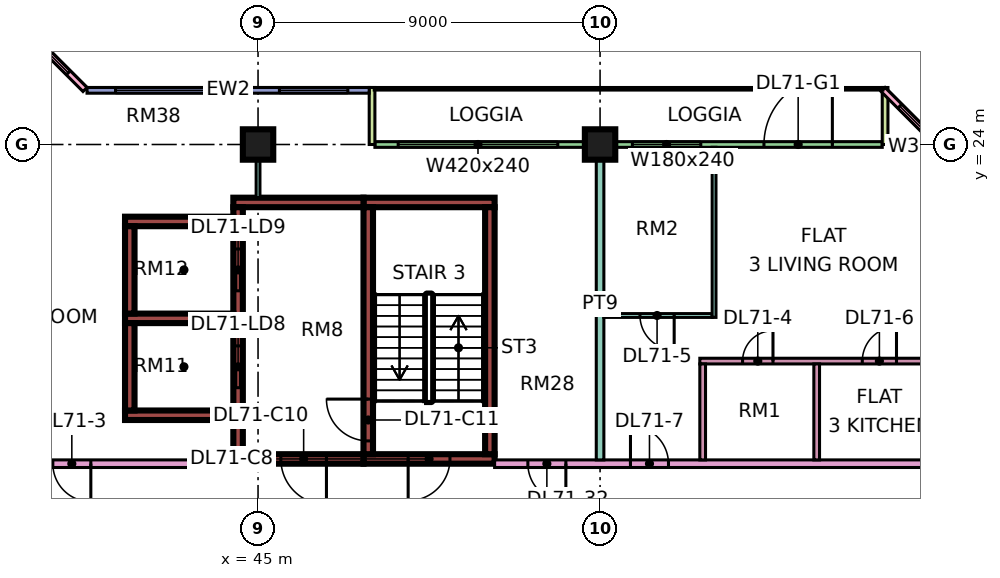
"""IFC4 building model, lengths in metres.
Left out: names, types, materials, properties, quantities, classifications, styles, units other than length and angle.
Written with IfcOpenShell. Run it as: python <this file> out.ifc"""

import sys

from ifc_helpers import new_model, si_unit, direction, frame, frame_2d, origin, origin_2d, place, context, subcontext, project, spatial, rectangle, extrude, element, fill, save


model = new_model("IFC4")
c1 = context("Model", 3, precision=1e-05, world=origin(), true_north=direction((0.0, 1.0)))
c2 = subcontext(c1, "Body", "Model", "MODEL_VIEW")
j1 = project(units=[si_unit("LENGTHUNIT", "METRE"), si_unit("PLANEANGLEUNIT", "RADIAN")], contexts=[c1])
p1 = place(None, origin())
s1 = spatial("IfcSite", under=j1, at=p1, CompositionType="ELEMENT")
p2 = place(p1, origin())
s2 = spatial("IfcBuilding", under=s1, at=p2, CompositionType="ELEMENT")
p3 = place(p2, frame((0.0, 0.0, 303.4)))
s3 = spatial("IfcBuildingStorey", under=s2, at=p3, CompositionType="ELEMENT", Elevation=303.4)
for number, where, z_axis, x_axis in (
    (1, (45.0, 24.0, 0.0), (0.0, 0.0, 1.0), (1.0, 0.0, 0.0)),
    (2, (54.0, 24.0, 0.0), (0.0, 0.0, 1.0), (1.0, 0.0, 0.0)),
):
    element("IfcColumn", number, at=place(p3, frame(where, z_axis=z_axis, x_axis=x_axis)), inside=s3, PredefinedType="COLUMN", context=c2, shape_type="SweptSolid", body=[
        extrude(rectangle(XDim=0.8, YDim=0.8, at=origin_2d()), origin(), (0.0, 0.0, 1.0), 3.75),
    ])
p4 = place(p3, frame((47.775, 15.725, 0.0), z_axis=(0.0, 0.0, 1.0), x_axis=(1.0, 0.0, 0.0)))
e3 = element("IfcWall", 3, at=p4, inside=s3, PredefinedType="SHEAR", context=c2, shape_type="SweptSolid", body=[
    extrude(rectangle(XDim=3.45, YDim=0.25, at=frame_2d((1.725, 0.0))), origin(), (0.0, 0.0, 1.0), 3.75),
])
p5 = place(p4, frame((1.175, 0.0, 0.0)))
e4 = element("IfcOpeningElement", 4, at=p5, cuts=e3, PredefinedType="OPENING", context=c2, shape_type="SweptSolid", body=[
    extrude(rectangle(XDim=1.1, YDim=2.2, at=frame_2d((0.55, 1.1))), frame((0.0, 0.135, 0.0), z_axis=(0.0, -1.0, 0.0), x_axis=(1.0, 0.0, 0.0)), (0.0, 0.0, 1.0), 0.27),
])
p6 = place(p3, frame((47.775, 22.475, 0.0), z_axis=(0.0, 0.0, 1.0), x_axis=(1.0, 0.0, 0.0)))
e5 = element("IfcWall", 5, at=p6, inside=s3, PredefinedType="SHEAR", context=c2, shape_type="SweptSolid", body=[
    extrude(rectangle(XDim=3.45, YDim=0.25, at=frame_2d((1.725, 0.0))), origin(), (0.0, 0.0, 1.0), 3.75),
])
p7 = place(p3, frame((47.9, 15.85, 0.0), z_axis=(0.0, 0.0, 1.0), x_axis=(0.0, 1.0, 0.0)))
e6 = element("IfcWall", 6, at=p7, inside=s3, PredefinedType="SHEAR", context=c2, shape_type="SweptSolid", body=[
    extrude(rectangle(XDim=6.5, YDim=0.25, at=frame_2d((3.25, 0.0))), origin(), (0.0, 0.0, 1.0), 3.75),
])
p8 = place(p7, frame((0.35, 0.0, 0.0)))
e7 = element("IfcOpeningElement", 7, at=p8, cuts=e6, PredefinedType="OPENING", context=c2, shape_type="SweptSolid", body=[
    extrude(rectangle(XDim=1.1, YDim=2.2, at=frame_2d((0.55, 1.1))), frame((0.0, 0.135, 0.0), z_axis=(0.0, -1.0, 0.0), x_axis=(1.0, 0.0, 0.0)), (0.0, 0.0, 1.0), 0.27),
])
p9 = place(p3, frame((51.1, 15.85, 0.0), z_axis=(0.0, 0.0, 1.0), x_axis=(0.0, 1.0, 0.0)))
e8 = element("IfcWall", 8, at=p9, inside=s3, PredefinedType="SHEAR", context=c2, shape_type="SweptSolid", body=[
    extrude(rectangle(XDim=6.5, YDim=0.25, at=frame_2d((3.25, 0.0))), origin(), (0.0, 0.0, 1.0), 3.75),
])
p10 = place(p3, frame((44.35, 15.725, 0.0), z_axis=(0.0, 0.0, 1.0), x_axis=(1.0, 0.0, 0.0)))
e9 = element("IfcWall", 9, at=p10, inside=s3, PredefinedType="SHEAR", context=c2, shape_type="SweptSolid", body=[
    extrude(rectangle(XDim=3.425, YDim=0.25, at=frame_2d((1.712, 0.0))), origin(), (0.0, 0.0, 1.0), 3.75),
])
p11 = place(p10, frame((1.25, 0.0, 0.0)))
e10 = element("IfcOpeningElement", 10, at=p11, cuts=e9, PredefinedType="OPENING", context=c2, shape_type="SweptSolid", body=[
    extrude(rectangle(XDim=1.2, YDim=2.2, at=frame_2d((0.6, 1.1))), frame((0.0, 0.135, 0.0), z_axis=(0.0, -1.0, 0.0), x_axis=(1.0, 0.0, 0.0)), (0.0, 0.0, 1.0), 0.27),
])
p12 = place(p3, frame((44.35, 22.475, 0.0), z_axis=(0.0, 0.0, 1.0), x_axis=(1.0, 0.0, 0.0)))
e11 = element("IfcWall", 11, at=p12, inside=s3, PredefinedType="SHEAR", context=c2, shape_type="SweptSolid", body=[
    extrude(rectangle(XDim=3.425, YDim=0.25, at=frame_2d((1.712, 0.0))), origin(), (0.0, 0.0, 1.0), 3.75),
])
p13 = place(p3, frame((44.475, 15.85, 0.0), z_axis=(0.0, 0.0, 1.0), x_axis=(0.0, 1.0, 0.0)))
e12 = element("IfcWall", 12, at=p13, inside=s3, PredefinedType="SHEAR", context=c2, shape_type="SweptSolid", body=[
    extrude(rectangle(XDim=6.5, YDim=0.25, at=frame_2d((3.25, 0.0))), origin(), (0.0, 0.0, 1.0), 3.75),
])
p14 = place(p13, frame((1.75, 0.0, 0.0)))
e13 = element("IfcOpeningElement", 13, at=p14, cuts=e12, PredefinedType="OPENING", context=c2, shape_type="SweptSolid", body=[
    extrude(rectangle(XDim=1.1, YDim=2.2, at=frame_2d((0.55, 1.1))), frame((0.0, 0.135, 0.0), z_axis=(0.0, -1.0, 0.0), x_axis=(1.0, 0.0, 0.0)), (0.0, 0.0, 1.0), 0.27),
])
p15 = place(p13, frame((4.3, 0.0, 0.0)))
e14 = element("IfcOpeningElement", 14, at=p15, cuts=e12, PredefinedType="OPENING", context=c2, shape_type="SweptSolid", body=[
    extrude(rectangle(XDim=1.1, YDim=2.2, at=frame_2d((0.55, 1.1))), frame((0.0, 0.135, 0.0), z_axis=(0.0, -1.0, 0.0), x_axis=(1.0, 0.0, 0.0)), (0.0, 0.0, 1.0), 0.27),
])
for number, where, z_axis, x_axis in (
    (15, (41.5, 16.875, 0.0), (0.0, 0.0, 1.0), (1.0, 0.0, 0.0)),
    (16, (41.5, 19.425, 0.0), (0.0, 0.0, 1.0), (1.0, 0.0, 0.0)),
    (17, (41.5, 21.975, 0.0), (0.0, 0.0, 1.0), (1.0, 0.0, 0.0)),
):
    element("IfcWall", number, at=place(p3, frame(where, z_axis=z_axis, x_axis=x_axis)), inside=s3, PredefinedType="SHEAR", context=c2, shape_type="SweptSolid", body=[
        extrude(rectangle(XDim=2.85, YDim=0.25, at=frame_2d((1.425, 0.0))), origin(), (0.0, 0.0, 1.0), 3.75),
    ])
for number, where, z_axis, x_axis in (
    (18, (41.625, 17.0, 0.0), (0.0, 0.0, 1.0), (0.0, 1.0, 0.0)),
    (19, (41.625, 19.55, 0.0), (0.0, 0.0, 1.0), (0.0, 1.0, 0.0)),
):
    element("IfcWall", number, at=place(p3, frame(where, z_axis=z_axis, x_axis=x_axis)), inside=s3, PredefinedType="SHEAR", context=c2, shape_type="SweptSolid", body=[
        extrude(rectangle(XDim=2.3, YDim=0.25, at=frame_2d((1.15, 0.0))), origin(), (0.0, 0.0, 1.0), 3.75),
    ])
p16 = place(p3, frame((61.425, 24.0, 0.0), z_axis=(0.0, 0.0, 1.0), x_axis=(-1.0, 0.0, 0.0)))
e20 = element("IfcWall", 20, at=p16, inside=s3, PredefinedType="SOLIDWALL", context=c2, shape_type="SweptSolid", body=[
    extrude(rectangle(XDim=13.35, YDim=0.15, at=frame_2d((6.675, 0.0))), origin(), (0.0, 0.0, 1.0), 3.35),
])
p17 = place(p16, frame((1.312, 0.0, 0.0)))
e21 = element("IfcOpeningElement", 21, at=p17, cuts=e20, PredefinedType="OPENING", context=c2, shape_type="SweptSolid", body=[
    extrude(rectangle(XDim=1.8, YDim=2.4, at=frame_2d((0.9, 1.2))), frame((0.0, 0.085, 0.0), z_axis=(0.0, -1.0, 0.0), x_axis=(1.0, 0.0, 0.0)), (0.0, 0.0, 1.0), 0.17),
])
p18 = place(p16, frame((4.775, 0.0, 0.45)))
e22 = element("IfcOpeningElement", 22, at=p18, cuts=e20, PredefinedType="OPENING", context=c2, shape_type="SweptSolid", body=[
    extrude(rectangle(XDim=1.8, YDim=2.4, at=frame_2d((0.9, 1.2))), frame((0.0, 0.085, 0.0), z_axis=(0.0, -1.0, 0.0), x_axis=(1.0, 0.0, 0.0)), (0.0, 0.0, 1.0), 0.17),
])
p19 = place(p16, frame((8.538, 0.0, 0.45)))
e23 = element("IfcOpeningElement", 23, at=p19, cuts=e20, PredefinedType="OPENING", context=c2, shape_type="SweptSolid", body=[
    extrude(rectangle(XDim=4.2, YDim=2.4, at=frame_2d((2.1, 1.2))), frame((0.0, 0.085, 0.0), z_axis=(0.0, -1.0, 0.0), x_axis=(1.0, 0.0, 0.0)), (0.0, 0.0, 1.0), 0.17),
])
for number, where, z_axis, x_axis in (
    (24, (61.5, 25.5, 0.0), (0.0, 0.0, 1.0), (0.0, -1.0, 0.0)),
    (25, (48.0, 25.5, 0.0), (0.0, 0.0, 1.0), (0.0, -1.0, 0.0)),
):
    element("IfcWall", number, at=place(p3, frame(where, z_axis=z_axis, x_axis=x_axis)), inside=s3, PredefinedType="SOLIDWALL", context=c2, shape_type="SweptSolid", body=[
        extrude(rectangle(XDim=1.5, YDim=0.15, at=frame_2d((0.75, 0.0))), origin(), (0.0, 0.0, 1.0), 3.35),
    ])
p20 = place(p3, frame((47.925, 25.425, 0.0), z_axis=(0.0, 0.0, 1.0), x_axis=(-1.0, 0.0, 0.0)))
e26 = element("IfcWall", 26, at=p20, inside=s3, PredefinedType="SOLIDWALL", context=c2, shape_type="SweptSolid", body=[
    extrude(rectangle(XDim=7.425, YDim=0.15, at=frame_2d((3.712, 0.0))), origin(), (0.0, 0.0, 1.0), 3.35),
])
p21 = place(p20, frame((0.562, 0.0, 0.45)))
e27 = element("IfcOpeningElement", 27, at=p21, cuts=e26, PredefinedType="OPENING", context=c2, shape_type="SweptSolid", body=[
    extrude(rectangle(XDim=1.8, YDim=2.4, at=frame_2d((0.9, 1.2))), frame((0.0, 0.085, 0.0), z_axis=(0.0, -1.0, 0.0), x_axis=(1.0, 0.0, 0.0)), (0.0, 0.0, 1.0), 0.17),
])
p22 = place(p20, frame((3.675, 0.0, 0.45)))
e28 = element("IfcOpeningElement", 28, at=p22, cuts=e26, PredefinedType="OPENING", context=c2, shape_type="SweptSolid", body=[
    extrude(rectangle(XDim=3.0, YDim=2.4, at=frame_2d((1.5, 1.2))), frame((0.0, 0.085, 0.0), z_axis=(0.0, -1.0, 0.0), x_axis=(1.0, 0.0, 0.0)), (0.0, 0.0, 1.0), 0.17),
])
p23 = place(p3, frame((40.447, 25.447, 0.0), z_axis=(0.0, 0.0, 1.0), x_axis=(-0.707106781187, 0.707106781187, 0.0)))
e29 = element("IfcWall", 29, at=p23, inside=s3, PredefinedType="SOLIDWALL", context=c2, shape_type="SweptSolid", body=[
    extrude(rectangle(XDim=4.243, YDim=0.15, at=frame_2d((2.121, 0.0))), origin(), (0.0, 0.0, 1.0), 3.35),
])
p24 = place(p23, frame((0.621, 0.0, 0.45)))
e30 = element("IfcOpeningElement", 30, at=p24, cuts=e29, PredefinedType="OPENING", context=c2, shape_type="SweptSolid", body=[
    extrude(rectangle(XDim=3.0, YDim=2.4, at=frame_2d((1.5, 1.2))), frame((0.0, 0.085, 0.0), z_axis=(0.0, -1.0, 0.0), x_axis=(1.0, 0.0, 0.0)), (0.0, 0.0, 1.0), 0.17),
])
p25 = place(p3, frame((64.447, 22.447, 0.0), z_axis=(0.0, 0.0, 1.0), x_axis=(-0.707106781187, 0.707106781187, 0.0)))
e31 = element("IfcWall", 31, at=p25, inside=s3, PredefinedType="SOLIDWALL", context=c2, shape_type="SweptSolid", body=[
    extrude(rectangle(XDim=4.243, YDim=0.15, at=frame_2d((2.121, 0.0))), origin(), (0.0, 0.0, 1.0), 3.35),
])
p26 = place(p25, frame((0.621, 0.0, 0.45)))
e32 = element("IfcOpeningElement", 32, at=p26, cuts=e31, PredefinedType="OPENING", context=c2, shape_type="SweptSolid", body=[
    extrude(rectangle(XDim=3.0, YDim=2.4, at=frame_2d((1.5, 1.2))), frame((0.0, 0.085, 0.0), z_axis=(0.0, -1.0, 0.0), x_axis=(1.0, 0.0, 0.0)), (0.0, 0.0, 1.0), 0.17),
])
p27 = place(p3, frame((34.0, 15.6, 0.0), z_axis=(0.0, 0.0, 1.0), x_axis=(1.0, 0.0, 0.0)))
e33 = element("IfcWall", 33, at=p27, inside=s3, PredefinedType="PARTITIONING", context=c2, shape_type="SweptSolid", body=[
    extrude(rectangle(XDim=10.35, YDim=0.2, at=frame_2d((5.175, 0.0))), origin(), (0.0, 0.0, 1.0), 3.35),
])
p28 = place(p27, frame((5.6, 0.0, 0.0)))
e34 = element("IfcOpeningElement", 34, at=p28, cuts=e33, PredefinedType="OPENING", context=c2, shape_type="SweptSolid", body=[
    extrude(rectangle(XDim=1.0, YDim=2.1, at=frame_2d((0.5, 1.05))), frame((0.0, 0.11, 0.0), z_axis=(0.0, -1.0, 0.0), x_axis=(1.0, 0.0, 0.0)), (0.0, 0.0, 1.0), 0.22),
])
p29 = place(p27, frame((0.45, 0.0, 0.0)))
e35 = element("IfcOpeningElement", 35, at=p29, cuts=e33, PredefinedType="OPENING", context=c2, shape_type="SweptSolid", body=[
    extrude(rectangle(XDim=1.2, YDim=2.1, at=frame_2d((0.6, 1.05))), frame((0.0, 0.11, 0.0), z_axis=(0.0, -1.0, 0.0), x_axis=(1.0, 0.0, 0.0)), (0.0, 0.0, 1.0), 0.22),
])
p30 = place(p3, frame((45.0, 22.6, 0.0), z_axis=(0.0, 0.0, 1.0), x_axis=(0.0, 1.0, 0.0)))
e36 = element("IfcWall", 36, at=p30, inside=s3, PredefinedType="PARTITIONING", context=c2, shape_type="SweptSolid", body=[
    extrude(rectangle(XDim=1.4, YDim=0.1, at=frame_2d((0.7, 0.0))), origin(), (0.0, 0.0, 1.0), 3.35),
])
p31 = place(p3, frame((51.225, 15.6, 0.0), z_axis=(0.0, 0.0, 1.0), x_axis=(1.0, 0.0, 0.0)))
e37 = element("IfcWall", 37, at=p31, inside=s3, PredefinedType="PARTITIONING", context=c2, shape_type="SweptSolid", body=[
    extrude(rectangle(XDim=13.125, YDim=0.2, at=frame_2d((6.562, 0.0))), origin(), (0.0, 0.0, 1.0), 3.35),
])
p32 = place(p31, frame((3.575, 0.0, 0.0)))
e38 = element("IfcOpeningElement", 38, at=p32, cuts=e37, PredefinedType="OPENING", context=c2, shape_type="SweptSolid", body=[
    extrude(rectangle(XDim=1.0, YDim=2.1, at=frame_2d((0.5, 1.05))), frame((0.0, 0.11, 0.0), z_axis=(0.0, -1.0, 0.0), x_axis=(1.0, 0.0, 0.0)), (0.0, 0.0, 1.0), 0.22),
])
p33 = place(p31, frame((0.875, 0.0, 0.0)))
e39 = element("IfcOpeningElement", 39, at=p33, cuts=e37, PredefinedType="OPENING", context=c2, shape_type="SweptSolid", body=[
    extrude(rectangle(XDim=1.0, YDim=2.1, at=frame_2d((0.5, 1.05))), frame((0.0, 0.11, 0.0), z_axis=(0.0, -1.0, 0.0), x_axis=(1.0, 0.0, 0.0)), (0.0, 0.0, 1.0), 0.22),
])
p34 = place(p3, frame((54.0, 15.7, 0.0), z_axis=(0.0, 0.0, 1.0), x_axis=(0.0, 1.0, 0.0)))
e40 = element("IfcWall", 40, at=p34, inside=s3, PredefinedType="PARTITIONING", context=c2, shape_type="SweptSolid", body=[
    extrude(rectangle(XDim=8.226, YDim=0.2, at=frame_2d((4.113, 0.0))), origin(), (0.0, 0.0, 1.0), 3.35),
])
p35 = place(p3, frame((54.1, 19.5, 0.0), z_axis=(0.0, 0.0, 1.0), x_axis=(1.0, 0.0, 0.0)))
e41 = element("IfcWall", 41, at=p35, inside=s3, PredefinedType="PARTITIONING", context=c2, shape_type="SweptSolid", body=[
    extrude(rectangle(XDim=2.85, YDim=0.1, at=frame_2d((1.425, 0.0))), origin(), (0.0, 0.0, 1.0), 3.35),
])
p36 = place(p35, frame((0.95, 0.0, 0.0)))
e42 = element("IfcOpeningElement", 42, at=p36, cuts=e41, PredefinedType="OPENING", context=c2, shape_type="SweptSolid", body=[
    extrude(rectangle(XDim=0.9, YDim=2.1, at=frame_2d((0.45, 1.05))), frame((0.0, 0.06, 0.0), z_axis=(0.0, -1.0, 0.0), x_axis=(1.0, 0.0, 0.0)), (0.0, 0.0, 1.0), 0.12),
])
p37 = place(p3, frame((56.625, 18.3, 0.0), z_axis=(0.0, 0.0, 1.0), x_axis=(1.0, 0.0, 0.0)))
e43 = element("IfcWall", 43, at=p37, inside=s3, PredefinedType="PARTITIONING", context=c2, shape_type="SweptSolid", body=[
    extrude(rectangle(XDim=7.725, YDim=0.15, at=frame_2d((3.863, 0.0))), origin(), (0.0, 0.0, 1.0), 3.35),
])
p38 = place(p37, frame((1.125, 0.0, 0.0)))
e44 = element("IfcOpeningElement", 44, at=p38, cuts=e43, PredefinedType="OPENING", context=c2, shape_type="SweptSolid", body=[
    extrude(rectangle(XDim=0.8, YDim=2.1, at=frame_2d((0.4, 1.05))), frame((0.0, 0.085, 0.0), z_axis=(0.0, -1.0, 0.0), x_axis=(1.0, 0.0, 0.0)), (0.0, 0.0, 1.0), 0.17),
])
p39 = place(p37, frame((4.275, 0.0, 0.0)))
e45 = element("IfcOpeningElement", 45, at=p39, cuts=e43, PredefinedType="OPENING", context=c2, shape_type="SweptSolid", body=[
    extrude(rectangle(XDim=0.9, YDim=2.1, at=frame_2d((0.45, 1.05))), frame((0.0, 0.085, 0.0), z_axis=(0.0, -1.0, 0.0), x_axis=(1.0, 0.0, 0.0)), (0.0, 0.0, 1.0), 0.17),
])
p40 = place(p3, frame((56.7, 15.7, 0.0), z_axis=(0.0, 0.0, 1.0), x_axis=(0.0, 1.0, 0.0)))
e46 = element("IfcWall", 46, at=p40, inside=s3, PredefinedType="PARTITIONING", context=c2, shape_type="SweptSolid", body=[
    extrude(rectangle(XDim=2.525, YDim=0.15, at=frame_2d((1.263, 0.0))), origin(), (0.0, 0.0, 1.0), 3.35),
])
p41 = place(p3, frame((57.0, 19.45, 0.0), z_axis=(0.0, 0.0, 1.0), x_axis=(0.0, 1.0, 0.0)))
e47 = element("IfcWall", 47, at=p41, inside=s3, PredefinedType="PARTITIONING", context=c2, shape_type="SweptSolid", body=[
    extrude(rectangle(XDim=4.476, YDim=0.1, at=frame_2d((2.238, 0.0))), origin(), (0.0, 0.0, 1.0), 3.35),
])
p42 = place(p3, frame((59.7, 15.7, 0.0), z_axis=(0.0, 0.0, 1.0), x_axis=(0.0, 1.0, 0.0)))
e48 = element("IfcWall", 48, at=p42, inside=s3, PredefinedType="PARTITIONING", context=c2, shape_type="SweptSolid", body=[
    extrude(rectangle(XDim=2.525, YDim=0.15, at=frame_2d((1.263, 0.0))), origin(), (0.0, 0.0, 1.0), 3.35),
])
p43 = place(p17, frame((1.8, 0.0, 0.0), z_axis=(0.0, 0.0, 1.0), x_axis=(-1.0, 0.0, 0.0)))
e49 = element("IfcDoor", 49, at=p43, inside=s3, OperationType="DOUBLE_DOOR_SINGLE_SWING", PredefinedType="DOOR", context=c2, shape_type="SweptSolid", body=[
    extrude(rectangle(XDim=1.8, YDim=2.4, at=frame_2d((0.9, 1.2))), frame((0.0, 0.025, 0.0), z_axis=(0.0, -1.0, 0.0), x_axis=(1.0, 0.0, 0.0)), (0.0, 0.0, 1.0), 0.05),
])
fill(e21, e49)
p44 = place(p18, origin())
e50 = element("IfcWindow", 50, at=p44, inside=s3, PartitioningType="SINGLE_PANEL", PredefinedType="WINDOW", context=c2, shape_type="SweptSolid", body=[
    extrude(rectangle(XDim=1.8, YDim=2.4, at=frame_2d((0.9, 1.2))), frame((0.0, 0.03, 0.0), z_axis=(0.0, -1.0, 0.0), x_axis=(1.0, 0.0, 0.0)), (0.0, 0.0, 1.0), 0.06),
])
fill(e22, e50)
p45 = place(p19, origin())
e51 = element("IfcWindow", 51, at=p45, inside=s3, PartitioningType="SINGLE_PANEL", PredefinedType="WINDOW", context=c2, shape_type="SweptSolid", body=[
    extrude(rectangle(XDim=4.2, YDim=2.4, at=frame_2d((2.1, 1.2))), frame((0.0, 0.03, 0.0), z_axis=(0.0, -1.0, 0.0), x_axis=(1.0, 0.0, 0.0)), (0.0, 0.0, 1.0), 0.06),
])
fill(e23, e51)
p46 = place(p21, origin())
e52 = element("IfcWindow", 52, at=p46, inside=s3, PartitioningType="SINGLE_PANEL", PredefinedType="WINDOW", context=c2, shape_type="SweptSolid", body=[
    extrude(rectangle(XDim=1.8, YDim=2.4, at=frame_2d((0.9, 1.2))), frame((0.0, 0.03, 0.0), z_axis=(0.0, -1.0, 0.0), x_axis=(1.0, 0.0, 0.0)), (0.0, 0.0, 1.0), 0.06),
])
fill(e27, e52)
p47 = place(p22, origin())
e53 = element("IfcWindow", 53, at=p47, inside=s3, PartitioningType="SINGLE_PANEL", PredefinedType="WINDOW", context=c2, shape_type="SweptSolid", body=[
    extrude(rectangle(XDim=3.0, YDim=2.4, at=frame_2d((1.5, 1.2))), frame((0.0, 0.03, 0.0), z_axis=(0.0, -1.0, 0.0), x_axis=(1.0, 0.0, 0.0)), (0.0, 0.0, 1.0), 0.06),
])
fill(e28, e53)
p48 = place(p24, origin())
e54 = element("IfcWindow", 54, at=p48, inside=s3, PartitioningType="SINGLE_PANEL", PredefinedType="WINDOW", context=c2, shape_type="SweptSolid", body=[
    extrude(rectangle(XDim=3.0, YDim=2.4, at=frame_2d((1.5, 1.2))), frame((0.0, 0.03, 0.0), z_axis=(0.0, -1.0, 0.0), x_axis=(1.0, 0.0, 0.0)), (0.0, 0.0, 1.0), 0.06),
])
fill(e30, e54)
p49 = place(p26, origin())
e55 = element("IfcWindow", 55, at=p49, inside=s3, PartitioningType="SINGLE_PANEL", PredefinedType="WINDOW", context=c2, shape_type="SweptSolid", body=[
    extrude(rectangle(XDim=3.0, YDim=2.4, at=frame_2d((1.5, 1.2))), frame((0.0, 0.03, 0.0), z_axis=(0.0, -1.0, 0.0), x_axis=(1.0, 0.0, 0.0)), (0.0, 0.0, 1.0), 0.06),
])
fill(e32, e55)
p50 = place(p5, frame((1.1, 0.0, 0.0), z_axis=(0.0, 0.0, 1.0), x_axis=(-1.0, 0.0, 0.0)))
e56 = element("IfcDoor", 56, at=p50, inside=s3, OperationType="SINGLE_SWING_LEFT", PredefinedType="DOOR", context=c2, shape_type="SweptSolid", body=[
    extrude(rectangle(XDim=1.1, YDim=2.2, at=frame_2d((0.55, 1.1))), frame((0.0, 0.025, 0.0), z_axis=(0.0, -1.0, 0.0), x_axis=(1.0, 0.0, 0.0)), (0.0, 0.0, 1.0), 0.05),
])
fill(e4, e56)
p51 = place(p11, origin())
e57 = element("IfcDoor", 57, at=p51, inside=s3, OperationType="SINGLE_SWING_RIGHT", PredefinedType="DOOR", context=c2, shape_type="SweptSolid", body=[
    extrude(rectangle(XDim=1.2, YDim=2.2, at=frame_2d((0.6, 1.1))), frame((0.0, 0.025, 0.0), z_axis=(0.0, -1.0, 0.0), x_axis=(1.0, 0.0, 0.0)), (0.0, 0.0, 1.0), 0.05),
])
fill(e10, e57)
p52 = place(p8, frame((1.1, 0.0, 0.0), z_axis=(0.0, 0.0, 1.0), x_axis=(-1.0, 0.0, 0.0)))
e58 = element("IfcDoor", 58, at=p52, inside=s3, OperationType="SINGLE_SWING_RIGHT", PredefinedType="DOOR", context=c2, shape_type="SweptSolid", body=[
    extrude(rectangle(XDim=1.1, YDim=2.2, at=frame_2d((0.55, 1.1))), frame((0.0, 0.025, 0.0), z_axis=(0.0, -1.0, 0.0), x_axis=(1.0, 0.0, 0.0)), (0.0, 0.0, 1.0), 0.05),
])
fill(e7, e58)
p53 = place(p14, origin())
e59 = element("IfcDoor", 59, at=p53, inside=s3, OperationType="DOUBLE_DOOR_SLIDING", PredefinedType="DOOR", context=c2, shape_type="SweptSolid", body=[
    extrude(rectangle(XDim=1.1, YDim=2.2, at=frame_2d((0.55, 1.1))), frame((0.0, 0.025, 0.0), z_axis=(0.0, -1.0, 0.0), x_axis=(1.0, 0.0, 0.0)), (0.0, 0.0, 1.0), 0.05),
])
fill(e13, e59)
p54 = place(p15, origin())
e60 = element("IfcDoor", 60, at=p54, inside=s3, OperationType="DOUBLE_DOOR_SLIDING", PredefinedType="DOOR", context=c2, shape_type="SweptSolid", body=[
    extrude(rectangle(XDim=1.1, YDim=2.2, at=frame_2d((0.55, 1.1))), frame((0.0, 0.025, 0.0), z_axis=(0.0, -1.0, 0.0), x_axis=(1.0, 0.0, 0.0)), (0.0, 0.0, 1.0), 0.05),
])
fill(e14, e60)
p55 = place(p28, origin())
e61 = element("IfcDoor", 61, at=p55, inside=s3, OperationType="SINGLE_SWING_RIGHT", PredefinedType="DOOR", context=c2, shape_type="SweptSolid", body=[
    extrude(rectangle(XDim=1.0, YDim=2.1, at=frame_2d((0.5, 1.05))), frame((0.0, 0.025, 0.0), z_axis=(0.0, -1.0, 0.0), x_axis=(1.0, 0.0, 0.0)), (0.0, 0.0, 1.0), 0.05),
])
fill(e34, e61)
p56 = place(p38, frame((0.8, 0.0, 0.0), z_axis=(0.0, 0.0, 1.0), x_axis=(-1.0, 0.0, 0.0)))
e62 = element("IfcDoor", 62, at=p56, inside=s3, OperationType="SINGLE_SWING_RIGHT", PredefinedType="DOOR", context=c2, shape_type="SweptSolid", body=[
    extrude(rectangle(XDim=0.8, YDim=2.1, at=frame_2d((0.4, 1.05))), frame((0.0, 0.025, 0.0), z_axis=(0.0, -1.0, 0.0), x_axis=(1.0, 0.0, 0.0)), (0.0, 0.0, 1.0), 0.05),
])
fill(e44, e62)
p57 = place(p36, origin())
e63 = element("IfcDoor", 63, at=p57, inside=s3, OperationType="SINGLE_SWING_RIGHT", PredefinedType="DOOR", context=c2, shape_type="SweptSolid", body=[
    extrude(rectangle(XDim=0.9, YDim=2.1, at=frame_2d((0.45, 1.05))), frame((0.0, 0.025, 0.0), z_axis=(0.0, -1.0, 0.0), x_axis=(1.0, 0.0, 0.0)), (0.0, 0.0, 1.0), 0.05),
])
fill(e42, e63)
p58 = place(p39, frame((0.9, 0.0, 0.0), z_axis=(0.0, 0.0, 1.0), x_axis=(-1.0, 0.0, 0.0)))
e64 = element("IfcDoor", 64, at=p58, inside=s3, OperationType="SINGLE_SWING_RIGHT", PredefinedType="DOOR", context=c2, shape_type="SweptSolid", body=[
    extrude(rectangle(XDim=0.9, YDim=2.1, at=frame_2d((0.45, 1.05))), frame((0.0, 0.025, 0.0), z_axis=(0.0, -1.0, 0.0), x_axis=(1.0, 0.0, 0.0)), (0.0, 0.0, 1.0), 0.05),
])
fill(e45, e64)
p59 = place(p32, origin())
e65 = element("IfcDoor", 65, at=p59, inside=s3, OperationType="SINGLE_SWING_LEFT", PredefinedType="DOOR", context=c2, shape_type="SweptSolid", body=[
    extrude(rectangle(XDim=1.0, YDim=2.1, at=frame_2d((0.5, 1.05))), frame((0.0, 0.025, 0.0), z_axis=(0.0, -1.0, 0.0), x_axis=(1.0, 0.0, 0.0)), (0.0, 0.0, 1.0), 0.05),
])
fill(e38, e65)
p60 = place(p33, origin())
e66 = element("IfcDoor", 66, at=p60, inside=s3, OperationType="SINGLE_SWING_RIGHT", PredefinedType="DOOR", context=c2, shape_type="SweptSolid", body=[
    extrude(rectangle(XDim=1.0, YDim=2.1, at=frame_2d((0.5, 1.05))), frame((0.0, 0.025, 0.0), z_axis=(0.0, -1.0, 0.0), x_axis=(1.0, 0.0, 0.0)), (0.0, 0.0, 1.0), 0.05),
])
fill(e39, e66)
save(model, sys.argv[1])
